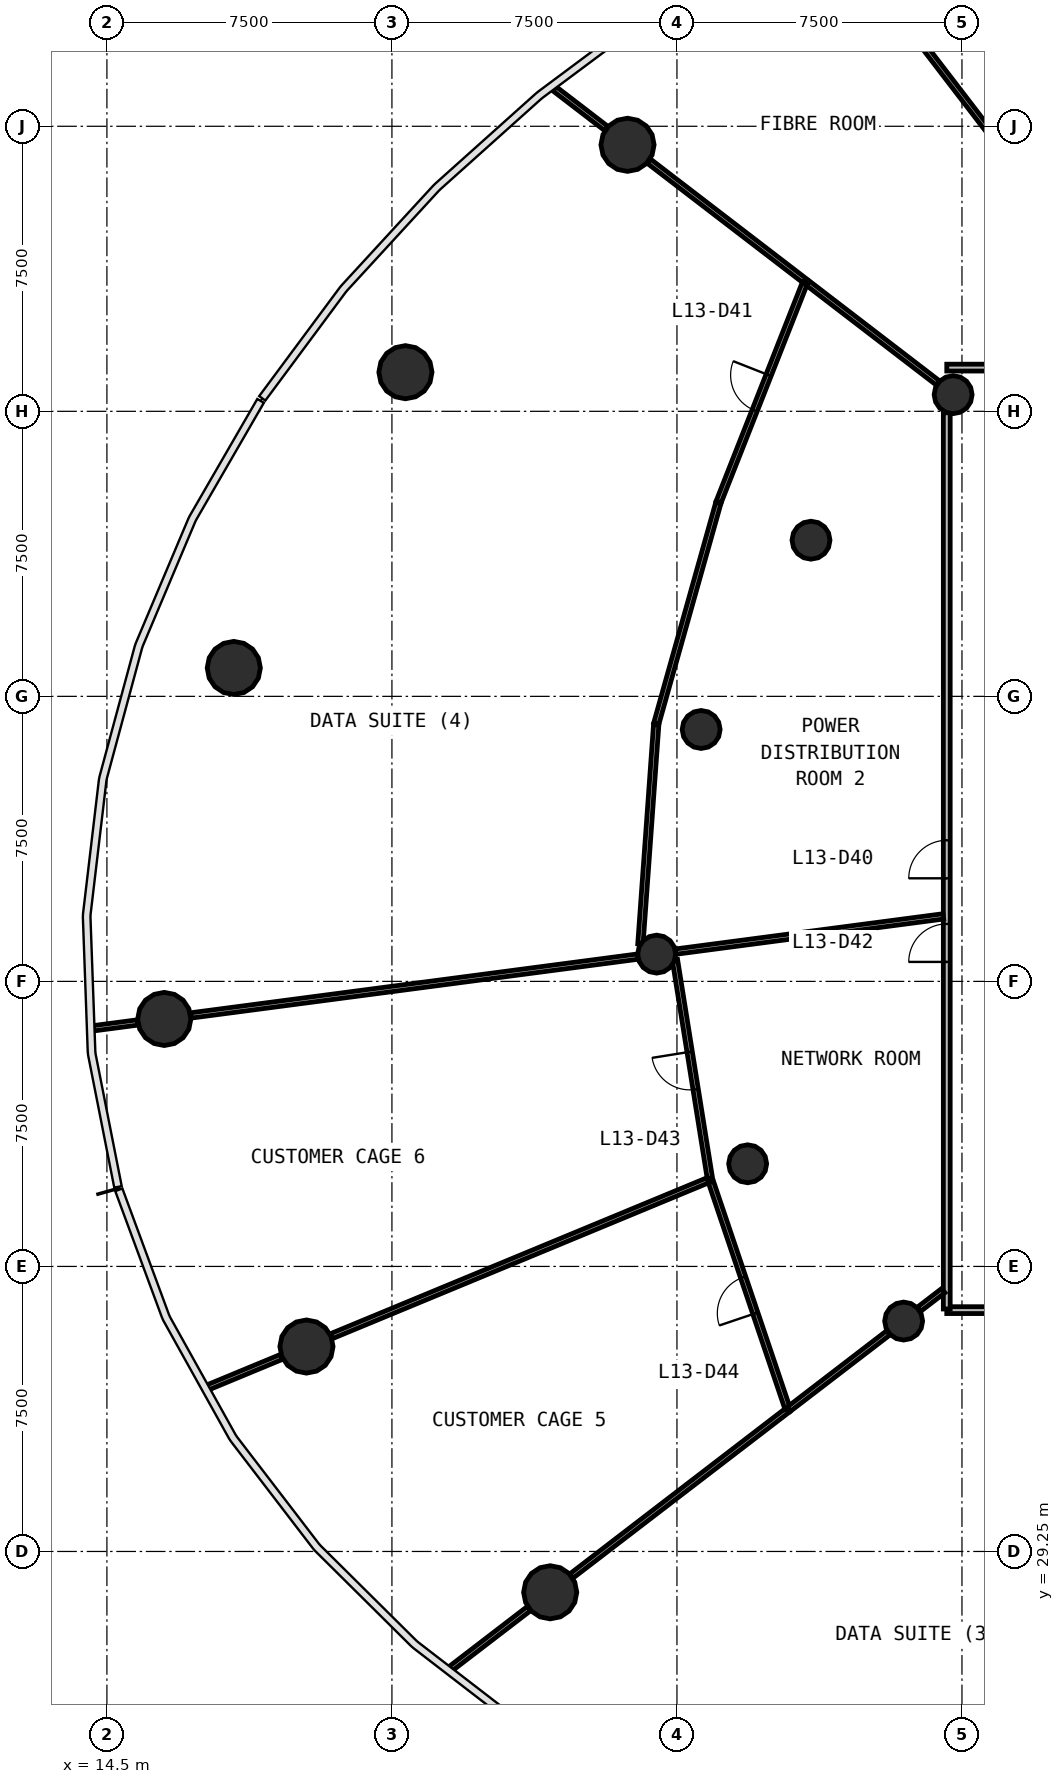
"""IFC4 building model, lengths in metres.
Left out: names, types, materials, properties, quantities, classifications, styles, units other than length and angle.
Written with IfcOpenShell. Run it as: python <this file> out.ifc"""

import sys

from ifc_helpers import new_model, si_unit, direction, frame, frame_2d, origin, origin_2d, place, context, subcontext, project, spatial, rectangle, circle, extrude, source, transform, mapped, element, fill, save


model = new_model("IFC4")
c1 = context("Model", 3, precision=1e-05, world=origin(), true_north=direction((0.0, 1.0)))
c2 = subcontext(c1, "Body", "Model", "MODEL_VIEW")
j1 = project(units=[si_unit("LENGTHUNIT", "METRE"), si_unit("PLANEANGLEUNIT", "RADIAN")], contexts=[c1])
p1 = place(None, origin())
s1 = spatial("IfcSite", under=j1, at=p1, CompositionType="ELEMENT")
p2 = place(p1, origin())
s2 = spatial("IfcBuilding", under=s1, at=p2, CompositionType="ELEMENT")
p3 = place(p2, frame((0.0, 0.0, 57.8)))
s3 = spatial("IfcBuildingStorey", under=s2, at=p3, CompositionType="ELEMENT", Elevation=57.8)
m1 = source(origin(), c2, "Body", "SweptSolid", [
    extrude(circle(Radius=0.7, at=origin_2d()), origin(), (0.0, 0.0, 1.0), 4.4),
])
for number, where, z_axis, x_axis in (
    (1, (28.199, 66.263, 0.0), (0.0, 0.0, 1.0), (1.0, 0.0, 0.0)),
    (2, (22.355, 60.279, 0.0), (0.0, 0.0, 1.0), (1.0, 0.0, 0.0)),
    (3, (17.839, 52.497, 0.0), (0.0, 0.0, 1.0), (1.0, 0.0, 0.0)),
    (4, (16.01, 43.262, 0.0), (0.0, 0.0, 1.0), (1.0, 0.0, 0.0)),
    (5, (19.751, 34.642, 0.0), (0.0, 0.0, 1.0), (1.0, 0.0, 0.0)),
    (6, (26.164, 28.176, 0.0), (0.0, 0.0, 1.0), (1.0, 0.0, 0.0)),
):
    element("IfcColumn", number, at=place(p3, frame(where, z_axis=z_axis, x_axis=x_axis)), inside=s3, PredefinedType="COLUMN", context=c2, shape_type="MappedRepresentation", body=[
        mapped(m1, transform((0.0, 0.0, 0.0), scale=1.0)),
    ])
m2 = source(origin(), c2, "Body", "SweptSolid", [
    extrude(circle(Radius=0.5, at=origin_2d()), origin(), (0.0, 0.0, 1.0), 4.4),
])
for number, where, z_axis, x_axis in (
    (7, (36.768, 59.688, 0.0), (0.0, 0.0, 1.0), (1.0, 0.0, 0.0)),
    (8, (33.028, 55.859, 0.0), (0.0, 0.0, 1.0), (1.0, 0.0, 0.0)),
    (9, (30.137, 50.878, 0.0), (0.0, 0.0, 1.0), (1.0, 0.0, 0.0)),
    (10, (28.966, 44.968, 0.0), (0.0, 0.0, 1.0), (1.0, 0.0, 0.0)),
    (11, (31.361, 39.451, 0.0), (0.0, 0.0, 1.0), (1.0, 0.0, 0.0)),
    (12, (35.465, 35.312, 0.0), (0.0, 0.0, 1.0), (1.0, 0.0, 0.0)),
):
    element("IfcColumn", number, at=place(p3, frame(where, z_axis=z_axis, x_axis=x_axis)), inside=s3, PredefinedType="COLUMN", context=c2, shape_type="MappedRepresentation", body=[
        mapped(m2, transform((0.0, 0.0, 0.0), scale=1.0)),
    ])
p4 = place(p3, frame((67.4, 35.6, 0.0), z_axis=(0.0, 0.0, 1.0), x_axis=(-1.0, 0.0, 0.0)))
e13 = element("IfcWall", 13, at=p4, inside=s3, PredefinedType="PARTITIONING", context=c2, shape_type="SweptSolid", body=[
    extrude(rectangle(XDim=30.8, YDim=0.18, at=frame_2d((15.4, 0.0))), origin(), (0.0, 0.0, 1.0), 3.05),
])
p5 = place(p4, frame((17.25, 0.0, 0.0)))
e14 = element("IfcOpeningElement", 14, at=p5, cuts=e13, PredefinedType="OPENING", context=c2, shape_type="SweptSolid", body=[
    extrude(rectangle(XDim=0.9, YDim=2.1, at=frame_2d((0.45, 1.05))), frame((0.0, 0.1, 0.0), z_axis=(0.0, -1.0, 0.0), x_axis=(1.0, 0.0, 0.0)), (0.0, 0.0, 1.0), 0.2),
])
p6 = place(p4, frame((14.85, 0.0, 0.0)))
e15 = element("IfcOpeningElement", 15, at=p6, cuts=e13, PredefinedType="OPENING", context=c2, shape_type="SweptSolid", body=[
    extrude(rectangle(XDim=0.9, YDim=2.1, at=frame_2d((0.45, 1.05))), frame((0.0, 0.1, 0.0), z_axis=(0.0, -1.0, 0.0), x_axis=(1.0, 0.0, 0.0)), (0.0, 0.0, 1.0), 0.2),
])
p7 = place(p4, frame((12.55, 0.0, 0.0)))
e16 = element("IfcOpeningElement", 16, at=p7, cuts=e13, PredefinedType="OPENING", context=c2, shape_type="SweptSolid", body=[
    extrude(rectangle(XDim=1.0, YDim=2.1, at=frame_2d((0.5, 1.05))), frame((0.0, 0.1, 0.0), z_axis=(0.0, -1.0, 0.0), x_axis=(1.0, 0.0, 0.0)), (0.0, 0.0, 1.0), 0.2),
])
p8 = place(p4, frame((20.95, 0.0, 0.0)))
e17 = element("IfcOpeningElement", 17, at=p8, cuts=e13, PredefinedType="OPENING", context=c2, shape_type="SweptSolid", body=[
    extrude(rectangle(XDim=1.0, YDim=2.1, at=frame_2d((0.5, 1.05))), frame((0.0, 0.1, 0.0), z_axis=(0.0, -1.0, 0.0), x_axis=(1.0, 0.0, 0.0)), (0.0, 0.0, 1.0), 0.2),
])
p9 = place(p3, frame((36.6, 60.4, 0.0), z_axis=(0.0, 0.0, 1.0), x_axis=(1.0, 0.0, 0.0)))
e18 = element("IfcWall", 18, at=p9, inside=s3, PredefinedType="PARTITIONING", context=c2, shape_type="SweptSolid", body=[
    extrude(rectangle(XDim=30.8, YDim=0.18, at=frame_2d((15.4, 0.0))), origin(), (0.0, 0.0, 1.0), 3.05),
])
p10 = place(p9, frame((20.95, 0.0, 0.0)))
e19 = element("IfcOpeningElement", 19, at=p10, cuts=e18, PredefinedType="OPENING", context=c2, shape_type="SweptSolid", body=[
    extrude(rectangle(XDim=1.0, YDim=2.1, at=frame_2d((0.5, 1.05))), frame((0.0, 0.1, 0.0), z_axis=(0.0, -1.0, 0.0), x_axis=(1.0, 0.0, 0.0)), (0.0, 0.0, 1.0), 0.2),
])
p11 = place(p9, frame((14.95, 0.0, 0.0)))
e20 = element("IfcOpeningElement", 20, at=p11, cuts=e18, PredefinedType="OPENING", context=c2, shape_type="SweptSolid", body=[
    extrude(rectangle(XDim=1.0, YDim=2.1, at=frame_2d((0.5, 1.05))), frame((0.0, 0.1, 0.0), z_axis=(0.0, -1.0, 0.0), x_axis=(1.0, 0.0, 0.0)), (0.0, 0.0, 1.0), 0.2),
])
p12 = place(p9, frame((4.35, 0.0, 0.0)))
e21 = element("IfcOpeningElement", 21, at=p12, cuts=e18, PredefinedType="OPENING", context=c2, shape_type="SweptSolid", body=[
    extrude(rectangle(XDim=1.0, YDim=2.1, at=frame_2d((0.5, 1.05))), frame((0.0, 0.1, 0.0), z_axis=(0.0, -1.0, 0.0), x_axis=(1.0, 0.0, 0.0)), (0.0, 0.0, 1.0), 0.2),
])
p13 = place(p3, frame((36.6, 35.63, 0.0), z_axis=(0.0, 0.0, 1.0), x_axis=(0.0, 1.0, 0.0)))
e22 = element("IfcWall", 22, at=p13, inside=s3, PredefinedType="PARTITIONING", context=c2, shape_type="SweptSolid", body=[
    extrude(rectangle(XDim=23.583, YDim=0.18, at=frame_2d((11.791, 0.0))), origin(), (0.0, 0.0, 1.0), 3.05),
])
p14 = place(p13, frame((11.333, 0.0, 0.0)))
e23 = element("IfcOpeningElement", 23, at=p14, cuts=e22, PredefinedType="OPENING", context=c2, shape_type="SweptSolid", body=[
    extrude(rectangle(XDim=1.0, YDim=2.1, at=frame_2d((0.5, 1.05))), frame((0.0, 0.1, 0.0), z_axis=(0.0, -1.0, 0.0), x_axis=(1.0, 0.0, 0.0)), (0.0, 0.0, 1.0), 0.2),
])
p15 = place(p13, frame((9.133, 0.0, 0.0)))
e24 = element("IfcOpeningElement", 24, at=p15, cuts=e22, PredefinedType="OPENING", context=c2, shape_type="SweptSolid", body=[
    extrude(rectangle(XDim=1.0, YDim=2.1, at=frame_2d((0.5, 1.05))), frame((0.0, 0.1, 0.0), z_axis=(0.0, -1.0, 0.0), x_axis=(1.0, 0.0, 0.0)), (0.0, 0.0, 1.0), 0.2),
])
p16 = place(p3, frame((28.466, 44.902, 0.0), z_axis=(0.0, 0.0, 1.0), x_axis=(-0.991446586451, -0.130513088287, 0.0)))
e25 = element("IfcWall", 25, at=p16, inside=s3, PredefinedType="PARTITIONING", context=c2, shape_type="SweptSolid", body=[
    extrude(rectangle(XDim=11.86, YDim=0.14, at=frame_2d((5.93, 0.0))), origin(), (0.0, 0.0, 1.0), 3.05),
])
p17 = place(p3, frame((30.371, 39.041, 0.0), z_axis=(0.0, 0.0, 1.0), x_axis=(-0.923880877875, -0.382680184353, 0.0)))
e26 = element("IfcWall", 26, at=p17, inside=s3, PredefinedType="PARTITIONING", context=c2, shape_type="SweptSolid", body=[
    extrude(rectangle(XDim=10.79, YDim=0.14, at=frame_2d((5.395, 0.0))), origin(), (0.0, 0.0, 1.0), 3.05),
])
p18 = place(p3, frame((36.51, 45.961, 0.0), z_axis=(0.0, 0.0, 1.0), x_axis=(-0.99144622305, -0.130515848849, 0.0)))
e27 = element("IfcWall", 27, at=p18, inside=s3, PredefinedType="PARTITIONING", context=c2, shape_type="SweptSolid", body=[
    extrude(rectangle(XDim=7.104, YDim=0.14, at=frame_2d((3.552, 0.0))), origin(), (0.0, 0.0, 1.0), 3.05),
])
p19 = place(p3, frame((32.421, 32.977, 0.0), z_axis=(0.0, 0.0, 1.0), x_axis=(-0.793363922365, -0.608747637933, 0.0)))
e28 = element("IfcWall", 28, at=p19, inside=s3, PredefinedType="PARTITIONING", context=c2, shape_type="SweptSolid", body=[
    extrude(rectangle(XDim=7.182, YDim=0.14, at=frame_2d((3.591, 0.0))), origin(), (0.0, 0.0, 1.0), 3.05),
])
p20 = place(p3, frame((32.412, 33.005, 0.0), z_axis=(0.0, 0.0, 1.0), x_axis=(-0.32021163775, 0.947346033427, 0.0)))
e29 = element("IfcWall", 29, at=p20, inside=s3, PredefinedType="PARTITIONING", context=c2, shape_type="SweptSolid", body=[
    extrude(rectangle(XDim=6.302, YDim=0.14, at=frame_2d((3.151, 0.0))), origin(), (0.0, 0.0, 1.0), 3.05),
])
p21 = place(p20, frame((2.651, 0.0, 0.0)))
e30 = element("IfcOpeningElement", 30, at=p21, cuts=e29, PredefinedType="OPENING", context=c2, shape_type="SweptSolid", body=[
    extrude(rectangle(XDim=1.0, YDim=2.1, at=frame_2d((0.5, 1.05))), frame((0.0, 0.08, 0.0), z_axis=(0.0, -1.0, 0.0), x_axis=(1.0, 0.0, 0.0)), (0.0, 0.0, 1.0), 0.16),
])
p22 = place(p3, frame((30.597, 56.865, 0.0), z_axis=(0.0, 0.0, 1.0), x_axis=(0.36659433638, 0.930380885731, 0.0)))
e31 = element("IfcWall", 31, at=p22, inside=s3, PredefinedType="PARTITIONING", context=c2, shape_type="SweptSolid", body=[
    extrude(rectangle(XDim=6.238, YDim=0.14, at=frame_2d((3.119, 0.0))), origin(), (0.0, 0.0, 1.0), 3.05),
])
p23 = place(p22, frame((2.587, 0.0, 0.0)))
e32 = element("IfcOpeningElement", 32, at=p23, cuts=e31, PredefinedType="OPENING", context=c2, shape_type="SweptSolid", body=[
    extrude(rectangle(XDim=1.0, YDim=2.1, at=frame_2d((0.5, 1.05))), frame((0.0, 0.08, 0.0), z_axis=(0.0, -1.0, 0.0), x_axis=(1.0, 0.0, 0.0)), (0.0, 0.0, 1.0), 0.16),
])
p24 = place(p3, frame((30.589, 56.837, 0.0), z_axis=(0.0, 0.0, 1.0), x_axis=(-0.270856993037, -0.962619597413, 0.0)))
e33 = element("IfcWall", 33, at=p24, inside=s3, PredefinedType="PARTITIONING", context=c2, shape_type="SweptSolid", body=[
    extrude(rectangle(XDim=6.028, YDim=0.14, at=frame_2d((3.014, 0.0))), origin(), (0.0, 0.0, 1.0), 3.05),
])
p25 = place(p3, frame((30.366, 39.071, 0.0), z_axis=(0.0, 0.0, 1.0), x_axis=(-0.158005232047, 0.987438274854, 0.0)))
e34 = element("IfcWall", 34, at=p25, inside=s3, PredefinedType="PARTITIONING", context=c2, shape_type="SweptSolid", body=[
    extrude(rectangle(XDim=5.817, YDim=0.14, at=frame_2d((2.909, 0.0))), origin(), (0.0, 0.0, 1.0), 3.05),
])
p26 = place(p25, frame((2.368, 0.0, 0.0)))
e35 = element("IfcOpeningElement", 35, at=p26, cuts=e34, PredefinedType="OPENING", context=c2, shape_type="SweptSolid", body=[
    extrude(rectangle(XDim=1.0, YDim=2.1, at=frame_2d((0.5, 1.05))), frame((0.0, 0.08, 0.0), z_axis=(0.0, -1.0, 0.0), x_axis=(1.0, 0.0, 0.0)), (0.0, 0.0, 1.0), 0.16),
])
p27 = place(p3, frame((28.954, 51.004, 0.0), z_axis=(0.0, 0.0, 1.0), x_axis=(-0.071808050835, -0.997418469768, 0.0)))
e36 = element("IfcWall", 36, at=p27, inside=s3, PredefinedType="PARTITIONING", context=c2, shape_type="SweptSolid", body=[
    extrude(rectangle(XDim=5.783, YDim=0.14, at=frame_2d((2.892, 0.0))), origin(), (0.0, 0.0, 1.0), 3.05),
])
p28 = place(p3, frame((32.86, 62.687, 0.0), z_axis=(0.0, 0.0, 1.0), x_axis=(-0.793372969887, 0.608735846367, 0.0)))
e37 = element("IfcWall", 37, at=p28, inside=s3, PredefinedType="PARTITIONING", context=c2, shape_type="SweptSolid", body=[
    extrude(rectangle(XDim=5.17, YDim=0.14, at=frame_2d((2.585, 0.0))), origin(), (0.0, 0.0, 1.0), 3.05),
])
p29 = place(p3, frame((37.802, 66.504, 0.0), z_axis=(0.0, 0.0, 1.0), x_axis=(-0.608789725695, 0.793331626679, 0.0)))
e38 = element("IfcWall", 38, at=p29, inside=s3, PredefinedType="PARTITIONING", context=c2, shape_type="SweptSolid", body=[
    extrude(rectangle(XDim=4.55, YDim=0.14, at=frame_2d((2.275, 0.0))), origin(), (0.0, 0.0, 1.0), 3.05),
])
p30 = place(p3, frame((36.367, 59.995, 0.0), z_axis=(0.0, 0.0, 1.0), x_axis=(-0.793350599557, 0.608765000786, 0.0)))
e39 = element("IfcWall", 39, at=p30, inside=s3, PredefinedType="PARTITIONING", context=c2, shape_type="SweptSolid", body=[
    extrude(rectangle(XDim=4.318, YDim=0.14, at=frame_2d((2.159, 0.0))), origin(), (0.0, 0.0, 1.0), 3.05),
])
p31 = place(p3, frame((35.065, 35.005, 0.0), z_axis=(0.0, 0.0, 1.0), x_axis=(-0.793324272547, -0.608799308958, 0.0)))
e40 = element("IfcWall", 40, at=p31, inside=s3, PredefinedType="PARTITIONING", context=c2, shape_type="SweptSolid", body=[
    extrude(rectangle(XDim=3.302, YDim=0.14, at=frame_2d((1.651, 0.0))), origin(), (0.0, 0.0, 1.0), 3.05),
])
p32 = place(p3, frame((25.606, 27.747, 0.0), z_axis=(0.0, 0.0, 1.0), x_axis=(-0.793376767289, -0.608730897135, 0.0)))
e41 = element("IfcWall", 41, at=p32, inside=s3, PredefinedType="PARTITIONING", context=c2, shape_type="SweptSolid", body=[
    extrude(rectangle(XDim=2.602, YDim=0.14, at=frame_2d((1.301, 0.0))), origin(), (0.0, 0.0, 1.0), 3.05),
])
p33 = place(p3, frame((19.1, 34.372, 0.0), z_axis=(0.0, 0.0, 1.0), x_axis=(-0.923903507837, -0.382625545679, 0.0)))
e42 = element("IfcWall", 42, at=p33, inside=s3, PredefinedType="PARTITIONING", context=c2, shape_type="SweptSolid", body=[
    extrude(rectangle(XDim=2.127, YDim=0.14, at=frame_2d((1.063, 0.0))), origin(), (0.0, 0.0, 1.0), 3.05),
])
p34 = place(p3, frame((27.641, 66.691, 0.0), z_axis=(0.0, 0.0, 1.0), x_axis=(-0.793288592826, 0.608845800258, 0.0)))
e43 = element("IfcWall", 43, at=p34, inside=s3, PredefinedType="PARTITIONING", context=c2, shape_type="SweptSolid", body=[
    extrude(rectangle(XDim=1.719, YDim=0.14, at=frame_2d((0.86, 0.0))), origin(), (0.0, 0.0, 1.0), 3.05),
])
p35 = place(p3, frame((15.311, 43.17, 0.0), z_axis=(0.0, 0.0, 1.0), x_axis=(-0.991431026748, -0.130631233635, 0.0)))
e44 = element("IfcWall", 44, at=p35, inside=s3, PredefinedType="PARTITIONING", context=c2, shape_type="SweptSolid", body=[
    extrude(rectangle(XDim=1.179, YDim=0.14, at=frame_2d((0.59, 0.0))), origin(), (0.0, 0.0, 1.0), 3.05),
])
p36 = place(p3, frame((36.51, 36.114, 0.0), z_axis=(0.0, 0.0, 1.0), x_axis=(-0.793316076519, -0.608809989025, 0.0)))
e45 = element("IfcWall", 45, at=p36, inside=s3, PredefinedType="PARTITIONING", context=c2, shape_type="SweptSolid", body=[
    extrude(rectangle(XDim=0.812, YDim=0.14, at=frame_2d((0.406, 0.0))), origin(), (0.0, 0.0, 1.0), 3.05),
])
m3 = source(origin(), c2, "Body", "SweptSolid", [
    extrude(rectangle(XDim=1.0, YDim=2.1, at=frame_2d((0.5, 1.05))), frame((0.0, 0.025, 0.0), z_axis=(0.0, -1.0, 0.0), x_axis=(1.0, 0.0, 0.0)), (0.0, 0.0, 1.0), 0.05),
])
p37 = place(p14, origin())
e46 = element("IfcDoor", 46, at=p37, inside=s3, OperationType="SINGLE_SWING_LEFT", PredefinedType="DOOR", context=c2, shape_type="MappedRepresentation", body=[
    mapped(m3, transform((0.0, 0.0, 0.0), scale=1.0)),
])
fill(e23, e46)
p38 = place(p23, origin())
e47 = element("IfcDoor", 47, at=p38, inside=s3, OperationType="SINGLE_SWING_RIGHT", PredefinedType="DOOR", context=c2, shape_type="MappedRepresentation", body=[
    mapped(m3, transform((0.0, 0.0, 0.0), scale=1.0)),
])
fill(e32, e47)
p39 = place(p15, origin())
e48 = element("IfcDoor", 48, at=p39, inside=s3, OperationType="SINGLE_SWING_LEFT", PredefinedType="DOOR", context=c2, shape_type="MappedRepresentation", body=[
    mapped(m3, transform((0.0, 0.0, 0.0), scale=1.0)),
])
fill(e24, e48)
p40 = place(p26, origin())
e49 = element("IfcDoor", 49, at=p40, inside=s3, OperationType="SINGLE_SWING_RIGHT", PredefinedType="DOOR", context=c2, shape_type="MappedRepresentation", body=[
    mapped(m3, transform((0.0, 0.0, 0.0), scale=1.0)),
])
fill(e35, e49)
p41 = place(p21, origin())
e50 = element("IfcDoor", 50, at=p41, inside=s3, OperationType="SINGLE_SWING_LEFT", PredefinedType="DOOR", context=c2, shape_type="MappedRepresentation", body=[
    mapped(m3, transform((0.0, 0.0, 0.0), scale=1.0)),
])
fill(e30, e50)
save(model, sys.argv[1])
